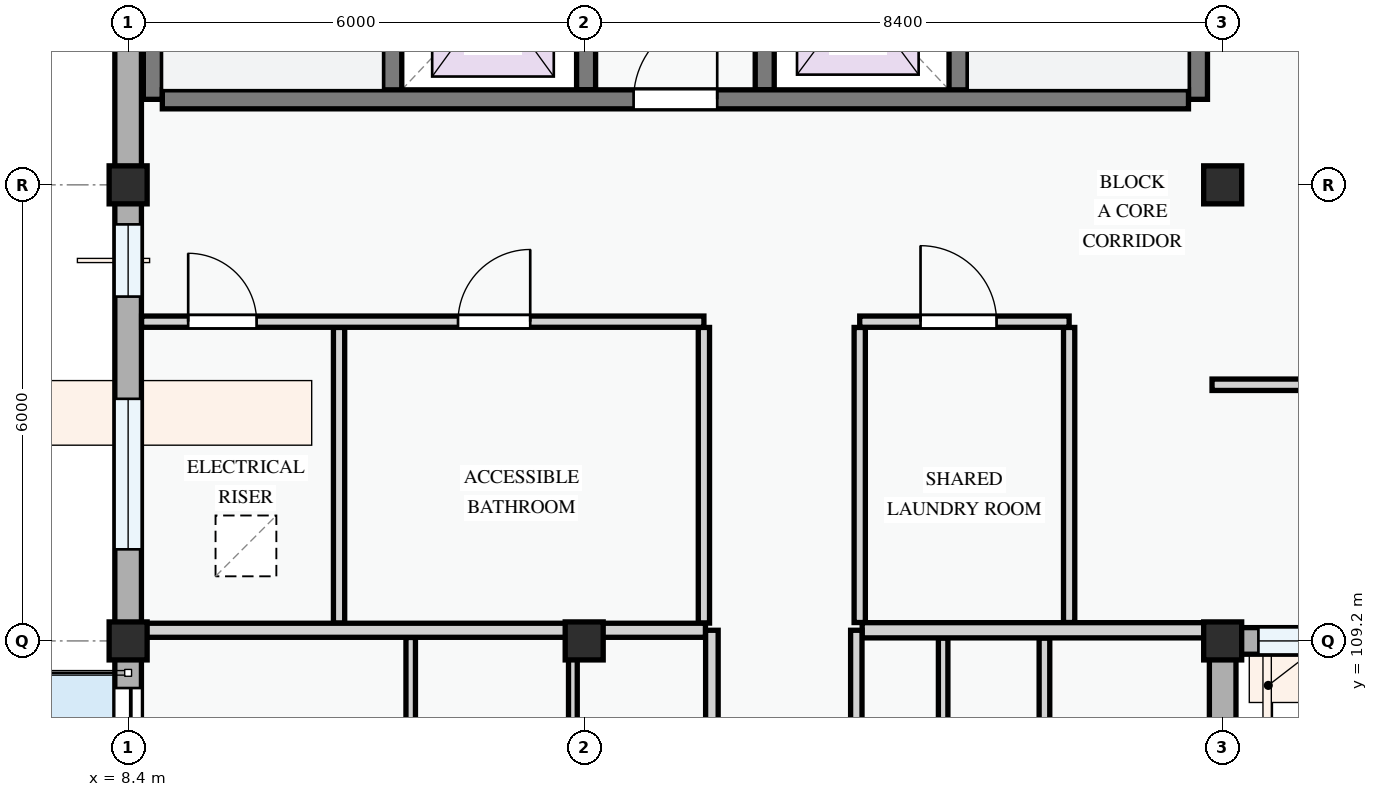
"""IFC4 building model, lengths in metres.
Left out: names, types, materials, properties, quantities, classifications, styles, units other than length and angle.
Written with IfcOpenShell. Run it as: python <this file> out.ifc"""

import sys

from ifc_helpers import new_model, si_unit, direction, frame, frame_2d, origin, origin_2d, place, context, subcontext, project, spatial, rectangle, extrude, element, fill, save


model = new_model("IFC4")
c1 = context("Model", 3, precision=1e-05, world=origin(), true_north=direction((0.0, 1.0)))
c2 = subcontext(c1, "Body", "Model", "MODEL_VIEW")
j1 = project(units=[si_unit("LENGTHUNIT", "METRE"), si_unit("PLANEANGLEUNIT", "RADIAN")], contexts=[c1])
p1 = place(None, origin())
s1 = spatial("IfcSite", under=j1, at=p1, CompositionType="ELEMENT")
p2 = place(p1, origin())
s2 = spatial("IfcBuilding", under=s1, at=p2, CompositionType="ELEMENT")
p3 = place(p2, frame((0.0, 0.0, 47.7)))
s3 = spatial("IfcBuildingStorey", under=s2, at=p3, CompositionType="ELEMENT", Elevation=47.7)
for number, where, z_axis, x_axis in (
    (1, (8.4, 109.2, 0.0), (0.0, 0.0, 1.0), (1.0, 0.0, 0.0)),
    (2, (8.4, 115.2, 0.0), (0.0, 0.0, 1.0), (1.0, 0.0, 0.0)),
    (3, (14.4, 109.2, 0.0), (0.0, 0.0, 1.0), (1.0, 0.0, 0.0)),
    (4, (22.8, 109.2, 0.0), (0.0, 0.0, 1.0), (1.0, 0.0, 0.0)),
    (5, (22.8, 115.2, 0.0), (0.0, 0.0, 1.0), (1.0, 0.0, 0.0)),
):
    element("IfcColumn", number, at=place(p3, frame(where, z_axis=z_axis, x_axis=x_axis)), inside=s3, PredefinedType="COLUMN", context=c2, shape_type="SweptSolid", body=[
        extrude(rectangle(XDim=0.5, YDim=0.5, at=origin_2d()), origin(), (0.0, 0.0, 1.0), 3.3),
    ])
p4 = place(p3, frame((22.8, 109.2, 0.0), z_axis=(0.0, 0.0, 1.0), x_axis=(1.0, 0.0, 0.0)))
e6 = element("IfcWall", 6, at=p4, inside=s3, PredefinedType="STANDARD", context=c2, shape_type="SweptSolid", body=[
    extrude(rectangle(XDim=6.0, YDim=0.35, at=frame_2d((3.0, 0.0))), origin(), (0.0, 0.0, 1.0), 2.525),
])
p5 = place(p4, frame((0.47, 0.0, 0.78)))
e7 = element("IfcOpeningElement", 7, at=p5, cuts=e6, PredefinedType="OPENING", context=c2, shape_type="SweptSolid", body=[
    extrude(rectangle(XDim=1.6, YDim=1.55, at=frame_2d((0.8, 0.775))), frame((0.0, 0.185, 0.0), z_axis=(0.0, -1.0, 0.0), x_axis=(1.0, 0.0, 0.0)), (0.0, 0.0, 1.0), 0.37),
])
p6 = place(p4, frame((3.53, 0.0, 0.78)))
e8 = element("IfcOpeningElement", 8, at=p6, cuts=e6, PredefinedType="OPENING", context=c2, shape_type="SweptSolid", body=[
    extrude(rectangle(XDim=1.1, YDim=1.3, at=frame_2d((0.55, 0.65))), frame((0.0, 0.185, 0.0), z_axis=(0.0, -1.0, 0.0), x_axis=(1.0, 0.0, 0.0)), (0.0, 0.0, 1.0), 0.37),
])
p7 = place(p3, frame((8.4, 123.6, 0.0), z_axis=(0.0, 0.0, 1.0), x_axis=(0.0, -1.0, 0.0)))
e9 = element("IfcWall", 9, at=p7, inside=s3, PredefinedType="STANDARD", context=c2, shape_type="SweptSolid", body=[
    extrude(rectangle(XDim=8.4, YDim=0.35, at=frame_2d((4.2, 0.0))), origin(), (0.0, 0.0, 1.0), 2.425),
])
p8 = place(p7, frame((1.156, 0.0, 0.78)))
e10 = element("IfcOpeningElement", 10, at=p8, cuts=e9, PredefinedType="OPENING", context=c2, shape_type="SweptSolid", body=[
    extrude(rectangle(XDim=1.68, YDim=1.46, at=frame_2d((0.84, 0.73))), frame((0.0, 0.185, 0.0), z_axis=(0.0, -1.0, 0.0), x_axis=(1.0, 0.0, 0.0)), (0.0, 0.0, 1.0), 0.37),
])
p9 = place(p7, frame((4.449, 0.0, 0.78)))
e11 = element("IfcOpeningElement", 11, at=p9, cuts=e9, PredefinedType="OPENING", context=c2, shape_type="SweptSolid", body=[
    extrude(rectangle(XDim=2.04, YDim=1.46, at=frame_2d((1.02, 0.73))), frame((0.0, 0.185, 0.0), z_axis=(0.0, -1.0, 0.0), x_axis=(1.0, 0.0, 0.0)), (0.0, 0.0, 1.0), 0.37),
])
p10 = place(p3, frame((8.4, 115.2, 0.0), z_axis=(0.0, 0.0, 1.0), x_axis=(0.0, -1.0, 0.0)))
e12 = element("IfcWall", 12, at=p10, inside=s3, PredefinedType="STANDARD", context=c2, shape_type="SweptSolid", body=[
    extrude(rectangle(XDim=6.0, YDim=0.35, at=frame_2d((3.0, 0.0))), origin(), (0.0, 0.0, 1.0), 2.575),
])
p11 = place(p10, frame((0.52, 0.0, 0.78)))
e13 = element("IfcOpeningElement", 13, at=p11, cuts=e12, PredefinedType="OPENING", context=c2, shape_type="SweptSolid", body=[
    extrude(rectangle(XDim=0.95, YDim=1.15, at=frame_2d((0.475, 0.575))), frame((0.0, 0.185, 0.0), z_axis=(0.0, -1.0, 0.0), x_axis=(1.0, 0.0, 0.0)), (0.0, 0.0, 1.0), 0.37),
])
p12 = place(p10, frame((2.815, 0.0, 0.78)))
e14 = element("IfcOpeningElement", 14, at=p12, cuts=e12, PredefinedType="OPENING", context=c2, shape_type="SweptSolid", body=[
    extrude(rectangle(XDim=1.98, YDim=1.5, at=frame_2d((0.99, 0.75))), frame((0.0, 0.185, 0.0), z_axis=(0.0, -1.0, 0.0), x_axis=(1.0, 0.0, 0.0)), (0.0, 0.0, 1.0), 0.37),
])
p13 = place(p3, frame((8.4, 109.2, 0.0), z_axis=(0.0, 0.0, 1.0), x_axis=(0.0, -1.0, 0.0)))
e15 = element("IfcWall", 15, at=p13, inside=s3, PredefinedType="STANDARD", context=c2, shape_type="SweptSolid", body=[
    extrude(rectangle(XDim=8.4, YDim=0.35, at=frame_2d((4.2, 0.0))), origin(), (0.0, 0.0, 1.0), 2.425),
])
p14 = place(p13, frame((0.62, 0.0, 0.0)))
e16 = element("IfcOpeningElement", 16, at=p14, cuts=e15, PredefinedType="OPENING", context=c2, shape_type="SweptSolid", body=[
    extrude(rectangle(XDim=1.5, YDim=2.2, at=frame_2d((0.75, 1.1))), frame((0.0, 0.185, 0.0), z_axis=(0.0, -1.0, 0.0), x_axis=(1.0, 0.0, 0.0)), (0.0, 0.0, 1.0), 0.37),
])
p15 = place(p13, frame((3.34, 0.0, 0.78)))
e17 = element("IfcOpeningElement", 17, at=p15, cuts=e15, PredefinedType="OPENING", context=c2, shape_type="SweptSolid", body=[
    extrude(rectangle(XDim=2.12, YDim=1.44, at=frame_2d((1.06, 0.72))), frame((0.0, 0.185, 0.0), z_axis=(0.0, -1.0, 0.0), x_axis=(1.0, 0.0, 0.0)), (0.0, 0.0, 1.0), 0.37),
])
p16 = place(p13, frame((6.945, 0.0, 0.78)))
e18 = element("IfcOpeningElement", 18, at=p16, cuts=e15, PredefinedType="OPENING", context=c2, shape_type="SweptSolid", body=[
    extrude(rectangle(XDim=0.95, YDim=1.15, at=frame_2d((0.475, 0.575))), frame((0.0, 0.185, 0.0), z_axis=(0.0, -1.0, 0.0), x_axis=(1.0, 0.0, 0.0)), (0.0, 0.0, 1.0), 0.37),
])
p17 = place(p3, frame((22.8, 100.8, 0.0), z_axis=(0.0, 0.0, 1.0), x_axis=(0.0, 1.0, 0.0)))
e19 = element("IfcWall", 19, at=p17, inside=s3, PredefinedType="STANDARD", context=c2, shape_type="SweptSolid", body=[
    extrude(rectangle(XDim=8.4, YDim=0.35, at=frame_2d((4.2, 0.0))), origin(), (0.0, 0.0, 1.0), 2.425),
])
p18 = place(p17, frame((0.517, 0.0, 0.78)))
e20 = element("IfcOpeningElement", 20, at=p18, cuts=e19, PredefinedType="OPENING", context=c2, shape_type="SweptSolid", body=[
    extrude(rectangle(XDim=0.9, YDim=1.2, at=frame_2d((0.45, 0.6))), frame((0.0, 0.185, 0.0), z_axis=(0.0, -1.0, 0.0), x_axis=(1.0, 0.0, 0.0)), (0.0, 0.0, 1.0), 0.37),
])
p19 = place(p17, frame((2.205, 0.0, 0.78)))
e21 = element("IfcOpeningElement", 21, at=p19, cuts=e19, PredefinedType="OPENING", context=c2, shape_type="SweptSolid", body=[
    extrude(rectangle(XDim=2.38, YDim=1.48, at=frame_2d((1.19, 0.74))), frame((0.0, 0.185, 0.0), z_axis=(0.0, -1.0, 0.0), x_axis=(1.0, 0.0, 0.0)), (0.0, 0.0, 1.0), 0.37),
])
p20 = place(p17, frame((6.008, 0.0, 0.78)))
e22 = element("IfcOpeningElement", 22, at=p20, cuts=e19, PredefinedType="OPENING", context=c2, shape_type="SweptSolid", body=[
    extrude(rectangle(XDim=1.1, YDim=1.3, at=frame_2d((0.55, 0.65))), frame((0.0, 0.185, 0.0), z_axis=(0.0, -1.0, 0.0), x_axis=(1.0, 0.0, 0.0)), (0.0, 0.0, 1.0), 0.37),
])
p21 = place(p3, frame((11.875, 123.25, 0.0), z_axis=(0.0, 0.0, 1.0), x_axis=(0.0, -1.0, 0.0)))
e23 = element("IfcWall", 23, at=p21, inside=s3, PredefinedType="SHEAR", context=c2, shape_type="SweptSolid", body=[
    extrude(rectangle(XDim=6.925, YDim=0.25, at=frame_2d((3.462, 0.0))), origin(), (0.0, 0.0, 1.0), 3.0),
])
p22 = place(p21, frame((0.35, 0.0, 0.0)))
e24 = element("IfcOpeningElement", 24, at=p22, cuts=e23, PredefinedType="OPENING", context=c2, shape_type="SweptSolid", body=[
    extrude(rectangle(XDim=0.95, YDim=2.1, at=frame_2d((0.475, 1.05))), frame((0.0, 0.135, 0.0), z_axis=(0.0, -1.0, 0.0), x_axis=(1.0, 0.0, 0.0)), (0.0, 0.0, 1.0), 0.27),
])
p23 = place(p3, frame((8.725, 123.4, 0.0), z_axis=(0.0, 0.0, 1.0), x_axis=(0.0, -1.0, 0.0)))
e25 = element("IfcWall", 25, at=p23, inside=s3, PredefinedType="SHEAR", context=c2, shape_type="SweptSolid", body=[
    extrude(rectangle(XDim=7.075, YDim=0.25, at=frame_2d((3.538, 0.0))), origin(), (0.0, 0.0, 1.0), 3.0),
])
p24 = place(p3, frame((22.475, 123.25, 0.0), z_axis=(0.0, 0.0, 1.0), x_axis=(0.0, -1.0, 0.0)))
e26 = element("IfcWall", 26, at=p24, inside=s3, PredefinedType="SHEAR", context=c2, shape_type="SweptSolid", body=[
    extrude(rectangle(XDim=6.925, YDim=0.25, at=frame_2d((3.462, 0.0))), origin(), (0.0, 0.0, 1.0), 3.0),
])
p25 = place(p3, frame((19.325, 123.25, 0.0), z_axis=(0.0, 0.0, 1.0), x_axis=(0.0, -1.0, 0.0)))
e27 = element("IfcWall", 27, at=p25, inside=s3, PredefinedType="SHEAR", context=c2, shape_type="SweptSolid", body=[
    extrude(rectangle(XDim=6.925, YDim=0.25, at=frame_2d((3.462, 0.0))), origin(), (0.0, 0.0, 1.0), 3.0),
])
p26 = place(p25, frame((0.35, 0.0, 0.0)))
e28 = element("IfcOpeningElement", 28, at=p26, cuts=e27, PredefinedType="OPENING", context=c2, shape_type="SweptSolid", body=[
    extrude(rectangle(XDim=0.95, YDim=2.1, at=frame_2d((0.475, 1.05))), frame((0.0, 0.135, 0.0), z_axis=(0.0, -1.0, 0.0), x_axis=(1.0, 0.0, 0.0)), (0.0, 0.0, 1.0), 0.27),
])
for number, where, z_axis, x_axis in (
    (29, (14.425, 118.875, 0.0), (0.0, 0.0, 1.0), (0.0, -1.0, 0.0)),
    (30, (16.775, 118.875, 0.0), (0.0, 0.0, 1.0), (0.0, -1.0, 0.0)),
):
    element("IfcWall", number, at=place(p3, frame(where, z_axis=z_axis, x_axis=x_axis)), inside=s3, PredefinedType="SHEAR", context=c2, shape_type="SweptSolid", body=[
        extrude(rectangle(XDim=2.425, YDim=0.25, at=frame_2d((1.212, 0.0))), origin(), (0.0, 0.0, 1.0), 3.0),
    ])
p27 = place(p3, frame((8.85, 116.325, 0.0), z_axis=(0.0, 0.0, 1.0), x_axis=(1.0, 0.0, 0.0)))
e31 = element("IfcWall", 31, at=p27, inside=s3, PredefinedType="SHEAR", context=c2, shape_type="SweptSolid", body=[
    extrude(rectangle(XDim=13.5, YDim=0.25, at=frame_2d((6.75, 0.0))), origin(), (0.0, 0.0, 1.0), 3.0),
])
p28 = place(p27, frame((6.2, 0.0, 0.0)))
e32 = element("IfcOpeningElement", 32, at=p28, cuts=e31, PredefinedType="OPENING", context=c2, shape_type="SweptSolid", body=[
    extrude(rectangle(XDim=1.1, YDim=2.15, at=frame_2d((0.55, 1.075))), frame((0.0, 0.135, 0.0), z_axis=(0.0, -1.0, 0.0), x_axis=(1.0, 0.0, 0.0)), (0.0, 0.0, 1.0), 0.27),
])
for number, where, z_axis, x_axis in (
    (33, (11.175, 113.324, 0.0), (0.0, 0.0, 1.0), (0.0, -1.0, 0.0)),
    (34, (15.975, 113.324, 0.0), (0.0, 0.0, 1.0), (0.0, -1.0, 0.0)),
):
    element("IfcWall", number, at=place(p3, frame(where, z_axis=z_axis, x_axis=x_axis)), inside=s3, PredefinedType="PARTITIONING", context=c2, shape_type="SweptSolid", body=[
        extrude(rectangle(XDim=3.889, YDim=0.148, at=frame_2d((1.945, 0.0))), origin(), (0.0, 0.0, 1.0), 3.0),
    ])
for number, where, z_axis, x_axis in (
    (35, (18.025, 113.324, 0.0), (0.0, 0.0, 1.0), (0.0, -1.0, 0.0)),
    (36, (20.78, 113.324, 0.0), (0.0, 0.0, 1.0), (0.0, -1.0, 0.0)),
):
    element("IfcWall", number, at=place(p3, frame(where, z_axis=z_axis, x_axis=x_axis)), inside=s3, PredefinedType="PARTITIONING", context=c2, shape_type="SweptSolid", body=[
        extrude(rectangle(XDim=3.882, YDim=0.148, at=frame_2d((1.941, 0.0))), origin(), (0.0, 0.0, 1.0), 3.0),
    ])
p29 = place(p3, frame((8.577, 113.4, 0.0), z_axis=(0.0, 0.0, 1.0), x_axis=(1.0, 0.0, 0.0)))
e37 = element("IfcWall", 37, at=p29, inside=s3, PredefinedType="PARTITIONING", context=c2, shape_type="SweptSolid", body=[
    extrude(rectangle(XDim=7.398, YDim=0.148, at=frame_2d((3.699, 0.0))), origin(), (0.0, 0.0, 1.0), 3.0),
])
p30 = place(p29, frame((0.613, 0.0, 0.0)))
e38 = element("IfcOpeningElement", 38, at=p30, cuts=e37, PredefinedType="OPENING", context=c2, shape_type="SweptSolid", body=[
    extrude(rectangle(XDim=0.9, YDim=2.1, at=frame_2d((0.45, 1.05))), frame((0.0, 0.084, 0.0), z_axis=(0.0, -1.0, 0.0), x_axis=(1.0, 0.0, 0.0)), (0.0, 0.0, 1.0), 0.168),
])
p31 = place(p29, frame((4.163, 0.0, 0.0)))
e39 = element("IfcOpeningElement", 39, at=p31, cuts=e37, PredefinedType="OPENING", context=c2, shape_type="SweptSolid", body=[
    extrude(rectangle(XDim=0.95, YDim=2.1, at=frame_2d((0.475, 1.05))), frame((0.0, 0.084, 0.0), z_axis=(0.0, -1.0, 0.0), x_axis=(1.0, 0.0, 0.0)), (0.0, 0.0, 1.0), 0.168),
])
p32 = place(p3, frame((18.025, 113.4, 0.0), z_axis=(0.0, 0.0, 1.0), x_axis=(1.0, 0.0, 0.0)))
e40 = element("IfcWall", 40, at=p32, inside=s3, PredefinedType="PARTITIONING", context=c2, shape_type="SweptSolid", body=[
    extrude(rectangle(XDim=2.755, YDim=0.148, at=frame_2d((1.377, 0.0))), origin(), (0.0, 0.0, 1.0), 3.0),
])
p33 = place(p32, frame((0.8, 0.0, 0.0)))
e41 = element("IfcOpeningElement", 41, at=p33, cuts=e40, PredefinedType="OPENING", context=c2, shape_type="SweptSolid", body=[
    extrude(rectangle(XDim=1.0, YDim=2.15, at=frame_2d((0.5, 1.075))), frame((0.0, 0.084, 0.0), z_axis=(0.0, -1.0, 0.0), x_axis=(1.0, 0.0, 0.0)), (0.0, 0.0, 1.0), 0.168),
])
p34 = place(p3, frame((22.66, 112.57, 0.0), z_axis=(0.0, 0.0, 1.0), x_axis=(1.0, 0.0, 0.0)))
e42 = element("IfcWall", 42, at=p34, inside=s3, PredefinedType="PARTITIONING", context=c2, shape_type="SweptSolid", body=[
    extrude(rectangle(XDim=2.406, YDim=0.15, at=frame_2d((1.203, 0.0))), origin(), (0.0, 0.0, 1.0), 3.0),
])
p35 = place(p3, frame((12.118, 102.642, 0.0), z_axis=(0.0, 0.0, 1.0), x_axis=(0.0, 1.0, 0.0)))
e43 = element("IfcWall", 43, at=p35, inside=s3, PredefinedType="PARTITIONING", context=c2, shape_type="SweptSolid", body=[
    extrude(rectangle(XDim=6.604, YDim=0.125, at=frame_2d((3.302, 0.0))), origin(), (0.0, 0.0, 1.0), 3.0),
])
p36 = place(p3, frame((14.251, 102.642, 0.0), z_axis=(0.0, 0.0, 1.0), x_axis=(0.0, 1.0, 0.0)))
e44 = element("IfcWall", 44, at=p36, inside=s3, PredefinedType="PARTITIONING", context=c2, shape_type="SweptSolid", body=[
    extrude(rectangle(XDim=6.604, YDim=0.115, at=frame_2d((3.302, 0.0))), origin(), (0.0, 0.0, 1.0), 2.425),
])
p37 = place(p3, frame((20.455, 102.595, 0.0), z_axis=(0.0, 0.0, 1.0), x_axis=(0.0, 1.0, 0.0)))
e45 = element("IfcWall", 45, at=p37, inside=s3, PredefinedType="PARTITIONING", context=c2, shape_type="SweptSolid", body=[
    extrude(rectangle(XDim=6.643, YDim=0.14, at=frame_2d((3.321, 0.0))), origin(), (0.0, 0.0, 1.0), 3.0),
])
p38 = place(p3, frame((19.122, 102.595, 0.0), z_axis=(0.0, 0.0, 1.0), x_axis=(0.0, 1.0, 0.0)))
e46 = element("IfcWall", 46, at=p38, inside=s3, PredefinedType="PARTITIONING", context=c2, shape_type="SweptSolid", body=[
    extrude(rectangle(XDim=6.643, YDim=0.125, at=frame_2d((3.321, 0.0))), origin(), (0.0, 0.0, 1.0), 3.0),
])
p39 = place(p3, frame((8.577, 109.34, 0.0), z_axis=(0.0, 0.0, 1.0), x_axis=(1.0, 0.0, 0.0)))
e47 = element("IfcWall", 47, at=p39, inside=s3, PredefinedType="PARTITIONING", context=c2, shape_type="SweptSolid", body=[
    extrude(rectangle(XDim=7.419, YDim=0.185, at=frame_2d((3.709, 0.0))), origin(), (0.0, 0.0, 1.0), 2.375),
])
p40 = place(p3, frame((18.057, 109.34, 0.0), z_axis=(0.0, 0.0, 1.0), x_axis=(1.0, 0.0, 0.0)))
e48 = element("IfcWall", 48, at=p40, inside=s3, PredefinedType="PARTITIONING", context=c2, shape_type="SweptSolid", body=[
    extrude(rectangle(XDim=4.683, YDim=0.2, at=frame_2d((2.342, 0.0))), origin(), (0.0, 0.0, 1.0), 2.375),
])
p41 = place(p3, frame((16.08, 86.577, 0.0), z_axis=(0.0, 0.0, 1.0), x_axis=(0.0, 1.0, 0.0)))
e49 = element("IfcWall", 49, at=p41, inside=s3, PredefinedType="PARTITIONING", context=c2, shape_type="SweptSolid", body=[
    extrude(rectangle(XDim=22.763, YDim=0.165, at=frame_2d((11.382, 0.0))), origin(), (0.0, 0.0, 1.0), 3.0),
])
p42 = place(p41, frame((1.943, 0.0, 0.0)))
e50 = element("IfcOpeningElement", 50, at=p42, cuts=e49, PredefinedType="OPENING", context=c2, shape_type="SweptSolid", body=[
    extrude(rectangle(XDim=0.92, YDim=2.1, at=frame_2d((0.46, 1.05))), frame((0.0, 0.093, 0.0), z_axis=(0.0, -1.0, 0.0), x_axis=(1.0, 0.0, 0.0)), (0.0, 0.0, 1.0), 0.185),
])
p43 = place(p41, frame((10.728, 0.0, 0.0)))
e51 = element("IfcOpeningElement", 51, at=p43, cuts=e49, PredefinedType="OPENING", context=c2, shape_type="SweptSolid", body=[
    extrude(rectangle(XDim=0.96, YDim=2.12, at=frame_2d((0.48, 1.06))), frame((0.0, 0.093, 0.0), z_axis=(0.0, -1.0, 0.0), x_axis=(1.0, 0.0, 0.0)), (0.0, 0.0, 1.0), 0.185),
])
p44 = place(p3, frame((17.98, 86.577, 0.0), z_axis=(0.0, 0.0, 1.0), x_axis=(0.0, 1.0, 0.0)))
e52 = element("IfcWall", 52, at=p44, inside=s3, PredefinedType="PARTITIONING", context=c2, shape_type="SweptSolid", body=[
    extrude(rectangle(XDim=22.763, YDim=0.15, at=frame_2d((11.382, 0.0))), origin(), (0.0, 0.0, 1.0), 3.0),
])
p45 = place(p44, frame((1.812, 0.0, 0.0)))
e53 = element("IfcOpeningElement", 53, at=p45, cuts=e52, PredefinedType="OPENING", context=c2, shape_type="SweptSolid", body=[
    extrude(rectangle(XDim=0.92, YDim=2.1, at=frame_2d((0.46, 1.05))), frame((0.0, 0.085, 0.0), z_axis=(0.0, -1.0, 0.0), x_axis=(1.0, 0.0, 0.0)), (0.0, 0.0, 1.0), 0.17),
])
p46 = place(p44, frame((10.715, 0.0, 0.0)))
e54 = element("IfcOpeningElement", 54, at=p46, cuts=e52, PredefinedType="OPENING", context=c2, shape_type="SweptSolid", body=[
    extrude(rectangle(XDim=0.92, YDim=2.1, at=frame_2d((0.46, 1.05))), frame((0.0, 0.085, 0.0), z_axis=(0.0, -1.0, 0.0), x_axis=(1.0, 0.0, 0.0)), (0.0, 0.0, 1.0), 0.17),
])
p47 = place(p5, origin())
e55 = element("IfcWindow", 55, at=p47, inside=s3, PartitioningType="DOUBLE_PANEL_VERTICAL", PredefinedType="WINDOW", context=c2, shape_type="SweptSolid", body=[
    extrude(rectangle(XDim=1.6, YDim=1.55, at=frame_2d((0.8, 0.775))), frame((0.0, 0.03, 0.0), z_axis=(0.0, -1.0, 0.0), x_axis=(1.0, 0.0, 0.0)), (0.0, 0.0, 1.0), 0.06),
])
fill(e7, e55)
p48 = place(p11, origin())
e56 = element("IfcWindow", 56, at=p48, inside=s3, PartitioningType="SINGLE_PANEL", PredefinedType="WINDOW", context=c2, shape_type="SweptSolid", body=[
    extrude(rectangle(XDim=0.95, YDim=1.15, at=frame_2d((0.475, 0.575))), frame((0.0, 0.03, 0.0), z_axis=(0.0, -1.0, 0.0), x_axis=(1.0, 0.0, 0.0)), (0.0, 0.0, 1.0), 0.06),
])
fill(e13, e56)
p49 = place(p12, origin())
e57 = element("IfcWindow", 57, at=p49, inside=s3, PartitioningType="DOUBLE_PANEL_VERTICAL", PredefinedType="WINDOW", context=c2, shape_type="SweptSolid", body=[
    extrude(rectangle(XDim=1.98, YDim=1.5, at=frame_2d((0.99, 0.75))), frame((0.0, 0.03, 0.0), z_axis=(0.0, -1.0, 0.0), x_axis=(1.0, 0.0, 0.0)), (0.0, 0.0, 1.0), 0.06),
])
fill(e14, e57)
p50 = place(p14, frame((1.5, 0.0, 0.0), z_axis=(0.0, 0.0, 1.0), x_axis=(-1.0, 0.0, 0.0)))
e58 = element("IfcDoor", 58, at=p50, inside=s3, OperationType="SLIDING_TO_RIGHT", PredefinedType="DOOR", context=c2, shape_type="SweptSolid", body=[
    extrude(rectangle(XDim=1.5, YDim=2.2, at=frame_2d((0.75, 1.1))), frame((0.0, 0.025, 0.0), z_axis=(0.0, -1.0, 0.0), x_axis=(1.0, 0.0, 0.0)), (0.0, 0.0, 1.0), 0.05),
])
fill(e16, e58)
p51 = place(p28, origin())
e59 = element("IfcDoor", 59, at=p51, inside=s3, OperationType="SINGLE_SWING_RIGHT", PredefinedType="DOOR", context=c2, shape_type="SweptSolid", body=[
    extrude(rectangle(XDim=1.1, YDim=2.15, at=frame_2d((0.55, 1.075))), frame((0.0, 0.025, 0.0), z_axis=(0.0, -1.0, 0.0), x_axis=(1.0, 0.0, 0.0)), (0.0, 0.0, 1.0), 0.05),
])
fill(e32, e59)
p52 = place(p30, origin())
e60 = element("IfcDoor", 60, at=p52, inside=s3, OperationType="SINGLE_SWING_LEFT", PredefinedType="DOOR", context=c2, shape_type="SweptSolid", body=[
    extrude(rectangle(XDim=0.9, YDim=2.1, at=frame_2d((0.45, 1.05))), frame((0.0, 0.025, 0.0), z_axis=(0.0, -1.0, 0.0), x_axis=(1.0, 0.0, 0.0)), (0.0, 0.0, 1.0), 0.05),
])
fill(e38, e60)
p53 = place(p31, origin())
e61 = element("IfcDoor", 61, at=p53, inside=s3, OperationType="SINGLE_SWING_RIGHT", PredefinedType="DOOR", context=c2, shape_type="SweptSolid", body=[
    extrude(rectangle(XDim=0.95, YDim=2.1, at=frame_2d((0.475, 1.05))), frame((0.0, 0.025, 0.0), z_axis=(0.0, -1.0, 0.0), x_axis=(1.0, 0.0, 0.0)), (0.0, 0.0, 1.0), 0.05),
])
fill(e39, e61)
p54 = place(p33, origin())
e62 = element("IfcDoor", 62, at=p54, inside=s3, OperationType="SINGLE_SWING_LEFT", PredefinedType="DOOR", context=c2, shape_type="SweptSolid", body=[
    extrude(rectangle(XDim=1.0, YDim=2.15, at=frame_2d((0.5, 1.075))), frame((0.0, 0.025, 0.0), z_axis=(0.0, -1.0, 0.0), x_axis=(1.0, 0.0, 0.0)), (0.0, 0.0, 1.0), 0.05),
])
fill(e41, e62)
save(model, sys.argv[1])
